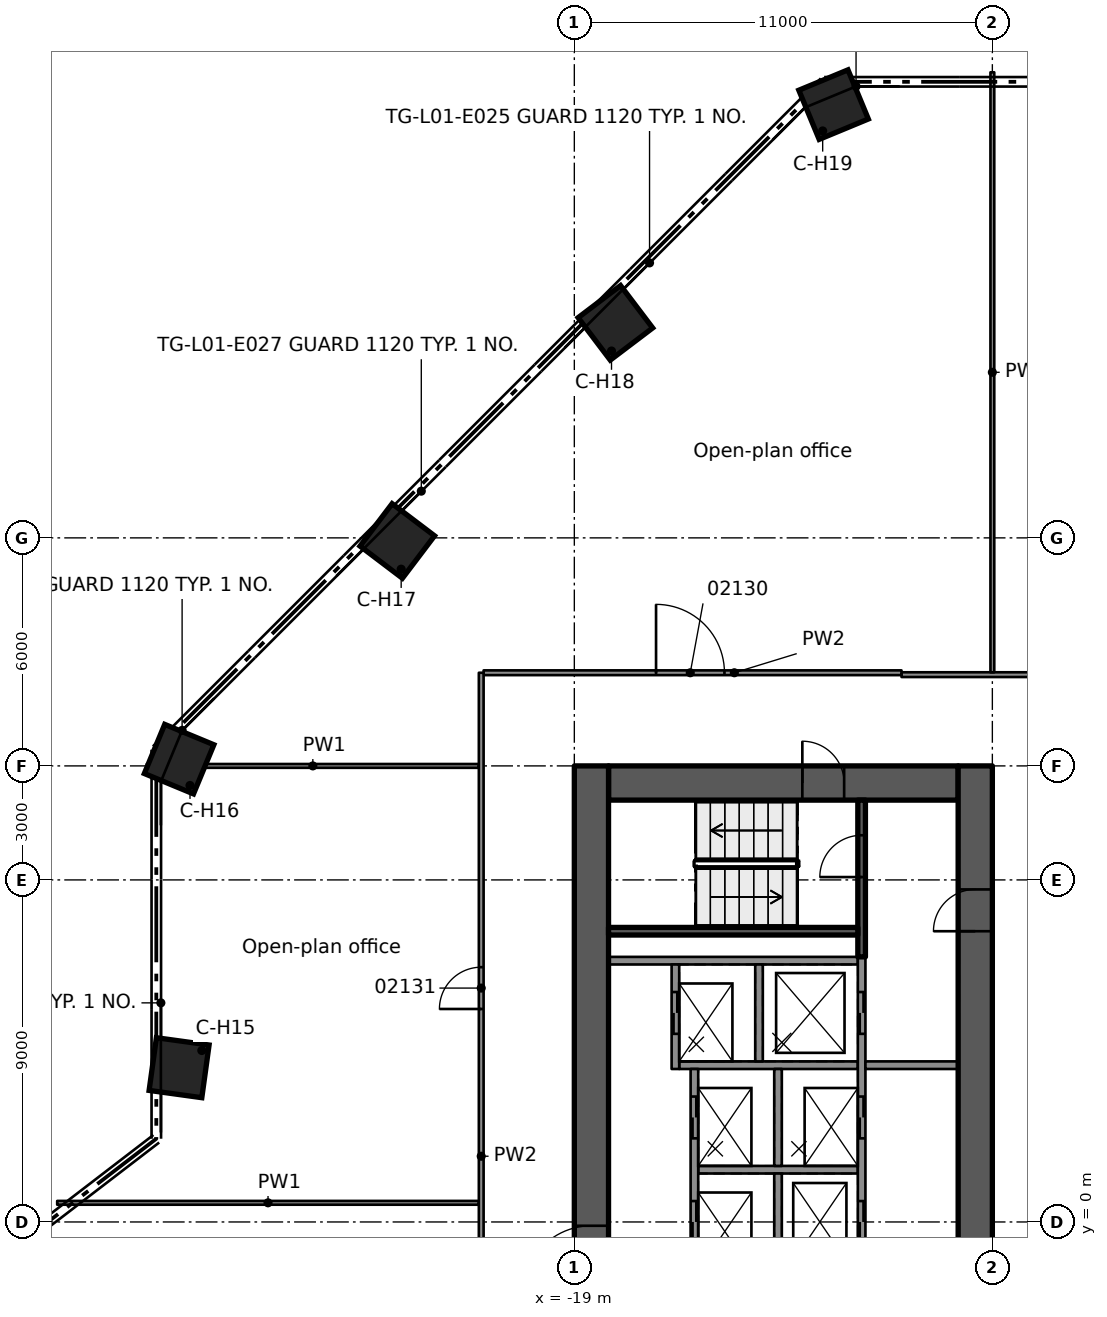
"""IFC4 building model, lengths in metres.
Left out: names, types, materials, properties, quantities, classifications, styles, units other than length and angle.
Written with IfcOpenShell. Run it as: python <this file> out.ifc"""

import sys

from ifc_helpers import new_model, si_unit, direction, frame, frame_2d, origin, origin_2d, place, context, subcontext, project, spatial, rectangle, extrude, element, fill, save


model = new_model("IFC4")
c1 = context("Model", 3, precision=1e-05, world=origin(), true_north=direction((0.0, 1.0)))
c2 = subcontext(c1, "Body", "Model", "MODEL_VIEW")
j1 = project(units=[si_unit("LENGTHUNIT", "METRE"), si_unit("PLANEANGLEUNIT", "RADIAN")], contexts=[c1])
p1 = place(None, origin())
s1 = spatial("IfcSite", under=j1, at=p1, CompositionType="ELEMENT")
p2 = place(p1, origin())
s2 = spatial("IfcBuilding", under=s1, at=p2, CompositionType="ELEMENT")
p3 = place(p2, frame((0.0, 0.0, 10.5)))
s3 = spatial("IfcBuildingStorey", under=s2, at=p3, CompositionType="ELEMENT", Elevation=10.5)
p4 = place(p3, frame((-18.1, 11.55, 0.0), z_axis=(0.0, 0.0, 1.0), x_axis=(1.0, 0.0, 0.0)))
e1 = element("IfcWall", 1, at=p4, inside=s3, PredefinedType="SHEAR", context=c2, shape_type="SweptSolid", body=[
    extrude(rectangle(XDim=9.2, YDim=0.9, at=frame_2d((4.6, 0.0))), origin(), (0.0, 0.0, 1.0), 5.0),
])
p5 = place(p4, frame((5.1, 0.0, 0.0)))
e2 = element("IfcOpeningElement", 2, at=p5, cuts=e1, PredefinedType="OPENING", context=c2, shape_type="SweptSolid", body=[
    extrude(rectangle(XDim=1.1, YDim=2.1, at=frame_2d((0.55, 1.05))), frame((0.0, 0.46, 0.0), z_axis=(0.0, -1.0, 0.0), x_axis=(1.0, 0.0, 0.0)), (0.0, 0.0, 1.0), 0.92),
])
p6 = place(p3, frame((-18.55, -12.0, 0.0), z_axis=(0.0, 0.0, 1.0), x_axis=(0.0, 1.0, 0.0)))
e3 = element("IfcWall", 3, at=p6, inside=s3, PredefinedType="SHEAR", context=c2, shape_type="SweptSolid", body=[
    extrude(rectangle(XDim=24.0, YDim=0.9, at=frame_2d((12.0, 0.0))), origin(), (0.0, 0.0, 1.0), 5.0),
])
p7 = place(p6, frame((10.1, 0.0, 0.0)))
e4 = element("IfcOpeningElement", 4, at=p7, cuts=e3, PredefinedType="OPENING", context=c2, shape_type="SweptSolid", body=[
    extrude(rectangle(XDim=1.8, YDim=2.1, at=frame_2d((0.9, 1.05))), frame((0.0, 0.46, 0.0), z_axis=(0.0, -1.0, 0.0), x_axis=(1.0, 0.0, 0.0)), (0.0, 0.0, 1.0), 0.92),
])
p8 = place(p3, frame((-8.45, -12.0, 0.0), z_axis=(0.0, 0.0, 1.0), x_axis=(0.0, 1.0, 0.0)))
e5 = element("IfcWall", 5, at=p8, inside=s3, PredefinedType="SHEAR", context=c2, shape_type="SweptSolid", body=[
    extrude(rectangle(XDim=24.0, YDim=0.9, at=frame_2d((12.0, 0.0))), origin(), (0.0, 0.0, 1.0), 5.0),
])
p9 = place(p8, frame((9.6, 0.0, 0.0)))
e6 = element("IfcOpeningElement", 6, at=p9, cuts=e5, PredefinedType="OPENING", context=c2, shape_type="SweptSolid", body=[
    extrude(rectangle(XDim=1.8, YDim=2.1, at=frame_2d((0.9, 1.05))), frame((0.0, 0.46, 0.0), z_axis=(0.0, -1.0, 0.0), x_axis=(1.0, 0.0, 0.0)), (0.0, 0.0, 1.0), 0.92),
])
p10 = place(p8, frame((19.65, 0.0, 0.0)))
e7 = element("IfcOpeningElement", 7, at=p10, cuts=e5, PredefinedType="OPENING", context=c2, shape_type="SweptSolid", body=[
    extrude(rectangle(XDim=1.1, YDim=2.1, at=frame_2d((0.55, 1.05))), frame((0.0, 0.46, 0.0), z_axis=(0.0, -1.0, 0.0), x_axis=(1.0, 0.0, 0.0)), (0.0, 0.0, 1.0), 0.92),
])
for number, where, z_axis, x_axis in (
    (8, (-29.4, 4.059, -1.0), (0.0, 0.0, 1.0), (0.707, 0.707, 0.0)),
    (9, (-29.4, 12.178, -1.0), (0.0, 0.0, 1.0), (0.707, 0.707, 0.0)),
    (10, (-23.659, 17.919, -1.0), (0.0, 0.0, 1.0), (0.707, 0.707, 0.0)),
    (11, (-17.919, 23.659, -1.0), (0.0, 0.0, 1.0), (0.707, 0.707, 0.0)),
    (12, (-12.178, 29.4, -1.0), (0.0, 0.0, 1.0), (0.707, 0.707, 0.0)),
):
    element("IfcColumn", number, at=place(p3, frame(where, z_axis=z_axis, x_axis=x_axis)), inside=s3, PredefinedType="COLUMN", context=c2, shape_type="SweptSolid", body=[
        extrude(rectangle(XDim=3.4, YDim=3.4, at=origin_2d()), origin(), (0.0, 0.0, 1.0), 1.0),
    ])
for number, where, z_axis, x_axis in (
    (13, (-29.4, 4.059, 0.0), (0.0, 0.0, 1.0), (-0.991, 0.137, 0.0)),
    (14, (-29.4, 12.178, 0.0), (0.0, 0.0, 1.0), (-0.924, 0.383, 0.0)),
    (15, (-23.659, 17.919, 0.0), (0.0, 0.0, 1.0), (-0.797, 0.604, 0.0)),
    (16, (-17.919, 23.659, 0.0), (0.0, 0.0, 1.0), (-0.604, 0.797, 0.0)),
    (17, (-12.178, 29.4, 0.0), (0.0, 0.0, 1.0), (-0.383, 0.924, 0.0)),
):
    element("IfcColumn", number, at=place(p3, frame(where, z_axis=z_axis, x_axis=x_axis)), inside=s3, PredefinedType="COLUMN", context=c2, shape_type="SweptSolid", body=[
        extrude(rectangle(XDim=1.4, YDim=1.4, at=origin_2d()), origin(), (0.0, 0.0, 1.0), 5.0),
    ])
p11 = place(p3, frame((-11.54, 6.875, 0.0), z_axis=(0.0, 0.0, 1.0), x_axis=(-1.0, 0.0, 0.0)))
e18 = element("IfcWall", 18, at=p11, inside=s3, PredefinedType="SOLIDWALL", context=c2, shape_type="SweptSolid", body=[
    extrude(rectangle(XDim=6.56, YDim=0.2, at=frame_2d((3.28, 0.0))), origin(), (0.0, 0.0, 1.0), 4.59),
])
p12 = place(p3, frame((-11.54, 1.375, 0.0), z_axis=(0.0, 0.0, 1.0), x_axis=(-1.0, 0.0, 0.0)))
e19 = element("IfcWall", 19, at=p12, inside=s3, PredefinedType="SOLIDWALL", context=c2, shape_type="SweptSolid", body=[
    extrude(rectangle(XDim=4.2, YDim=0.2, at=frame_2d((2.1, 0.0))), origin(), (0.0, 0.0, 1.0), 4.59),
])
p13 = place(p3, frame((-11.54, 4.125, 0.0), z_axis=(0.0, 0.0, 1.0), x_axis=(-1.0, 0.0, 0.0)))
e20 = element("IfcWall", 20, at=p13, inside=s3, PredefinedType="SOLIDWALL", context=c2, shape_type="SweptSolid", body=[
    extrude(rectangle(XDim=4.7, YDim=0.2, at=frame_2d((2.35, 0.0))), origin(), (0.0, 0.0, 1.0), 4.59),
])
p14 = place(p3, frame((-11.44, -6.975, 0.0), z_axis=(0.0, 0.0, 1.0), x_axis=(0.0, 1.0, 0.0)))
e21 = element("IfcWall", 21, at=p14, inside=s3, PredefinedType="SOLIDWALL", context=c2, shape_type="SweptSolid", body=[
    extrude(rectangle(XDim=13.95, YDim=0.2, at=frame_2d((6.975, 0.0))), origin(), (0.0, 0.0, 1.0), 4.59),
])
p15 = place(p14, frame((0.925, 0.0, 0.0)))
e22 = element("IfcOpeningElement", 22, at=p15, cuts=e21, PredefinedType="OPENING", context=c2, shape_type="SweptSolid", body=[
    extrude(rectangle(XDim=1.1, YDim=2.1, at=frame_2d((0.55, 1.05))), frame((0.0, 0.11, 0.0), z_axis=(0.0, -1.0, 0.0), x_axis=(1.0, 0.0, 0.0)), (0.0, 0.0, 1.0), 0.22),
])
p16 = place(p14, frame((6.425, 0.0, 0.0)))
e23 = element("IfcOpeningElement", 23, at=p16, cuts=e21, PredefinedType="OPENING", context=c2, shape_type="SweptSolid", body=[
    extrude(rectangle(XDim=1.1, YDim=2.1, at=frame_2d((0.55, 1.05))), frame((0.0, 0.11, 0.0), z_axis=(0.0, -1.0, 0.0), x_axis=(1.0, 0.0, 0.0)), (0.0, 0.0, 1.0), 0.22),
])
p17 = place(p14, frame((9.175, 0.0, 0.0)))
e24 = element("IfcOpeningElement", 24, at=p17, cuts=e21, PredefinedType="OPENING", context=c2, shape_type="SweptSolid", body=[
    extrude(rectangle(XDim=1.1, YDim=2.1, at=frame_2d((0.55, 1.05))), frame((0.0, 0.11, 0.0), z_axis=(0.0, -1.0, 0.0), x_axis=(1.0, 0.0, 0.0)), (0.0, 0.0, 1.0), 0.22),
])
p18 = place(p14, frame((11.925, 0.0, 0.0)))
e25 = element("IfcOpeningElement", 25, at=p18, cuts=e21, PredefinedType="OPENING", context=c2, shape_type="SweptSolid", body=[
    extrude(rectangle(XDim=1.1, YDim=2.1, at=frame_2d((0.55, 1.05))), frame((0.0, 0.11, 0.0), z_axis=(0.0, -1.0, 0.0), x_axis=(1.0, 0.0, 0.0)), (0.0, 0.0, 1.0), 0.22),
])
for number, where, z_axis, x_axis in (
    (26, (-13.64, -1.275, 0.0), (0.0, 0.0, 1.0), (0.0, 1.0, 0.0)),
    (27, (-13.64, 1.475, 0.0), (0.0, 0.0, 1.0), (0.0, 1.0, 0.0)),
    (28, (-14.14, 4.225, 0.0), (0.0, 0.0, 1.0), (0.0, 1.0, 0.0)),
):
    element("IfcWall", number, at=place(p3, frame(where, z_axis=z_axis, x_axis=x_axis)), inside=s3, PredefinedType="SOLIDWALL", context=c2, shape_type="SweptSolid", body=[
        extrude(rectangle(XDim=2.55, YDim=0.2, at=frame_2d((1.275, 0.0))), origin(), (0.0, 0.0, 1.0), 4.59),
    ])
p19 = place(p3, frame((-15.84, -4.025, 0.0), z_axis=(0.0, 0.0, 1.0), x_axis=(0.0, 1.0, 0.0)))
e29 = element("IfcWall", 29, at=p19, inside=s3, PredefinedType="SOLIDWALL", context=c2, shape_type="SweptSolid", body=[
    extrude(rectangle(XDim=8.05, YDim=0.2, at=frame_2d((4.025, 0.0))), origin(), (0.0, 0.0, 1.0), 4.59),
])
p20 = place(p19, frame((3.475, 0.0, 0.0)))
e30 = element("IfcOpeningElement", 30, at=p20, cuts=e29, PredefinedType="OPENING", context=c2, shape_type="SweptSolid", body=[
    extrude(rectangle(XDim=1.1, YDim=2.1, at=frame_2d((0.55, 1.05))), frame((0.0, 0.11, 0.0), z_axis=(0.0, -1.0, 0.0), x_axis=(1.0, 0.0, 0.0)), (0.0, 0.0, 1.0), 0.22),
])
p21 = place(p19, frame((6.225, 0.0, 0.0)))
e31 = element("IfcOpeningElement", 31, at=p21, cuts=e29, PredefinedType="OPENING", context=c2, shape_type="SweptSolid", body=[
    extrude(rectangle(XDim=1.1, YDim=2.1, at=frame_2d((0.55, 1.05))), frame((0.0, 0.11, 0.0), z_axis=(0.0, -1.0, 0.0), x_axis=(1.0, 0.0, 0.0)), (0.0, 0.0, 1.0), 0.22),
])
p22 = place(p3, frame((-16.34, 4.025, 0.0), z_axis=(0.0, 0.0, 1.0), x_axis=(0.0, 1.0, 0.0)))
e32 = element("IfcWall", 32, at=p22, inside=s3, PredefinedType="SOLIDWALL", context=c2, shape_type="SweptSolid", body=[
    extrude(rectangle(XDim=2.75, YDim=0.2, at=frame_2d((1.375, 0.0))), origin(), (0.0, 0.0, 1.0), 4.59),
])
p23 = place(p22, frame((0.925, 0.0, 0.0)))
e33 = element("IfcOpeningElement", 33, at=p23, cuts=e32, PredefinedType="OPENING", context=c2, shape_type="SweptSolid", body=[
    extrude(rectangle(XDim=1.1, YDim=2.1, at=frame_2d((0.55, 1.05))), frame((0.0, 0.11, 0.0), z_axis=(0.0, -1.0, 0.0), x_axis=(1.0, 0.0, 0.0)), (0.0, 0.0, 1.0), 0.22),
])
p24 = place(p3, frame((-11.44, 6.975, 0.0), z_axis=(0.0, 0.0, 1.0), x_axis=(0.0, 1.0, 0.0)))
e34 = element("IfcWall", 34, at=p24, inside=s3, PredefinedType="SOLIDWALL", context=c2, shape_type="SweptSolid", body=[
    extrude(rectangle(XDim=4.125, YDim=0.2, at=frame_2d((2.062, 0.0))), origin(), (0.0, 0.0, 1.0), 4.59),
])
p25 = place(p24, frame((2.1, 0.0, 0.0)))
e35 = element("IfcOpeningElement", 35, at=p25, cuts=e34, PredefinedType="OPENING", context=c2, shape_type="SweptSolid", body=[
    extrude(rectangle(XDim=1.1, YDim=2.1, at=frame_2d((0.55, 1.05))), frame((0.0, 0.11, 0.0), z_axis=(0.0, -1.0, 0.0), x_axis=(1.0, 0.0, 0.0)), (0.0, 0.0, 1.0), 0.22),
])
p26 = place(p3, frame((-11.54, 7.65, 0.0), z_axis=(0.0, 0.0, 1.0), x_axis=(-1.0, 0.0, 0.0)))
e36 = element("IfcWall", 36, at=p26, inside=s3, PredefinedType="SOLIDWALL", context=c2, shape_type="SweptSolid", body=[
    extrude(rectangle(XDim=6.56, YDim=0.2, at=frame_2d((3.28, 0.0))), origin(), (0.0, 0.0, 1.0), 4.59),
])
p27 = place(p3, frame((-8.9, 4.125, 0.0), z_axis=(0.0, 0.0, 1.0), x_axis=(-1.0, 0.0, 0.0)))
e37 = element("IfcWall", 37, at=p27, inside=s3, PredefinedType="PARTITIONING", context=c2, shape_type="SweptSolid", body=[
    extrude(rectangle(XDim=2.44, YDim=0.2, at=frame_2d((1.22, 0.0))), origin(), (0.0, 0.0, 1.0), 4.59),
])
p28 = place(p3, frame((-32.608, 0.504, 0.0), z_axis=(0.0, 0.0, 1.0), x_axis=(1.0, 0.0, 0.0)))
e38 = element("IfcWall", 38, at=p28, inside=s3, PredefinedType="PARTITIONING", context=c2, shape_type="SweptSolid", body=[
    extrude(rectangle(XDim=11.096, YDim=0.1, at=frame_2d((5.548, 0.0))), origin(), (0.0, 0.0, 1.0), 4.58),
])
p29 = place(p3, frame((-30.25, 12.0, 0.0), z_axis=(0.0, 0.0, 1.0), x_axis=(1.0, 0.0, 0.0)))
e39 = element("IfcWall", 39, at=p29, inside=s3, PredefinedType="PARTITIONING", context=c2, shape_type="SweptSolid", body=[
    extrude(rectangle(XDim=8.738, YDim=0.1, at=frame_2d((4.369, 0.0))), origin(), (0.0, 0.0, 1.0), 4.58),
])
p30 = place(p3, frame((-10.39, 14.401, 0.0), z_axis=(0.0, 0.0, 1.0), x_axis=(1.0, 0.0, 0.0)))
e40 = element("IfcWall", 40, at=p30, inside=s3, PredefinedType="PARTITIONING", context=c2, shape_type="SweptSolid", body=[
    extrude(rectangle(XDim=20.781, YDim=0.125, at=frame_2d((10.391, 0.0))), origin(), (0.0, 0.0, 1.0), 4.58),
])
p31 = place(p30, frame((13.49, 0.0, 0.0)))
e41 = element("IfcOpeningElement", 41, at=p31, cuts=e40, PredefinedType="OPENING", context=c2, shape_type="SweptSolid", body=[
    extrude(rectangle(XDim=1.8, YDim=2.1, at=frame_2d((0.9, 1.05))), frame((0.0, 0.073, 0.0), z_axis=(0.0, -1.0, 0.0), x_axis=(1.0, 0.0, 0.0)), (0.0, 0.0, 1.0), 0.145),
])
p32 = place(p30, frame((5.49, 0.0, 0.0)))
e42 = element("IfcOpeningElement", 42, at=p32, cuts=e40, PredefinedType="OPENING", context=c2, shape_type="SweptSolid", body=[
    extrude(rectangle(XDim=1.8, YDim=2.1, at=frame_2d((0.9, 1.05))), frame((0.0, 0.073, 0.0), z_axis=(0.0, -1.0, 0.0), x_axis=(1.0, 0.0, 0.0)), (0.0, 0.0, 1.0), 0.145),
])
p33 = place(p3, frame((-21.387, 14.451, 0.0), z_axis=(0.0, 0.0, 1.0), x_axis=(1.0, 0.0, 0.0)))
e43 = element("IfcWall", 43, at=p33, inside=s3, PredefinedType="PARTITIONING", context=c2, shape_type="SweptSolid", body=[
    extrude(rectangle(XDim=10.996, YDim=0.125, at=frame_2d((5.498, 0.0))), origin(), (0.0, 0.0, 1.0), 4.58),
])
p34 = place(p33, frame((4.538, 0.0, 0.0)))
e44 = element("IfcOpeningElement", 44, at=p34, cuts=e43, PredefinedType="OPENING", context=c2, shape_type="SweptSolid", body=[
    extrude(rectangle(XDim=1.8, YDim=2.1, at=frame_2d((0.9, 1.05))), frame((0.0, 0.073, 0.0), z_axis=(0.0, -1.0, 0.0), x_axis=(1.0, 0.0, 0.0)), (0.0, 0.0, 1.0), 0.145),
])
p35 = place(p3, frame((-8.0, 14.463, 0.0), z_axis=(0.0, 0.0, 1.0), x_axis=(0.0, 1.0, 0.0)))
e45 = element("IfcWall", 45, at=p35, inside=s3, PredefinedType="PARTITIONING", context=c2, shape_type="SweptSolid", body=[
    extrude(rectangle(XDim=15.787, YDim=0.1, at=frame_2d((7.894, 0.0))), origin(), (0.0, 0.0, 1.0), 4.58),
])
p36 = place(p3, frame((-21.45, -10.992, 0.0), z_axis=(0.0, 0.0, 1.0), x_axis=(0.0, 1.0, 0.0)))
e46 = element("IfcWall", 46, at=p36, inside=s3, PredefinedType="PARTITIONING", context=c2, shape_type="SweptSolid", body=[
    extrude(rectangle(XDim=25.443, YDim=0.125, at=frame_2d((12.721, 0.0))), origin(), (0.0, 0.0, 1.0), 4.58),
])
p37 = place(p36, frame((4.85, 0.0, 0.0)))
e47 = element("IfcOpeningElement", 47, at=p37, cuts=e46, PredefinedType="OPENING", context=c2, shape_type="SweptSolid", body=[
    extrude(rectangle(XDim=1.8, YDim=2.1, at=frame_2d((0.9, 1.05))), frame((0.0, 0.073, 0.0), z_axis=(0.0, -1.0, 0.0), x_axis=(1.0, 0.0, 0.0)), (0.0, 0.0, 1.0), 0.145),
])
p38 = place(p36, frame((16.596, 0.0, 0.0)))
e48 = element("IfcOpeningElement", 48, at=p38, cuts=e46, PredefinedType="OPENING", context=c2, shape_type="SweptSolid", body=[
    extrude(rectangle(XDim=1.1, YDim=2.1, at=frame_2d((0.55, 1.05))), frame((0.0, 0.073, 0.0), z_axis=(0.0, -1.0, 0.0), x_axis=(1.0, 0.0, 0.0)), (0.0, 0.0, 1.0), 0.145),
])
p39 = place(p16, origin())
e49 = element("IfcDoor", 49, at=p39, inside=s3, OperationType="DOUBLE_DOOR_SLIDING", PredefinedType="DOOR", context=c2, shape_type="SweptSolid", body=[
    extrude(rectangle(XDim=1.1, YDim=2.1, at=frame_2d((0.55, 1.05))), frame((0.0, 0.025, 0.0), z_axis=(0.0, -1.0, 0.0), x_axis=(1.0, 0.0, 0.0)), (0.0, 0.0, 1.0), 0.05),
])
fill(e23, e49)
p40 = place(p20, origin())
e50 = element("IfcDoor", 50, at=p40, inside=s3, OperationType="DOUBLE_DOOR_SLIDING", PredefinedType="DOOR", context=c2, shape_type="SweptSolid", body=[
    extrude(rectangle(XDim=1.1, YDim=2.1, at=frame_2d((0.55, 1.05))), frame((0.0, 0.025, 0.0), z_axis=(0.0, -1.0, 0.0), x_axis=(1.0, 0.0, 0.0)), (0.0, 0.0, 1.0), 0.05),
])
fill(e30, e50)
p41 = place(p17, origin())
e51 = element("IfcDoor", 51, at=p41, inside=s3, OperationType="DOUBLE_DOOR_SLIDING", PredefinedType="DOOR", context=c2, shape_type="SweptSolid", body=[
    extrude(rectangle(XDim=1.1, YDim=2.1, at=frame_2d((0.55, 1.05))), frame((0.0, 0.025, 0.0), z_axis=(0.0, -1.0, 0.0), x_axis=(1.0, 0.0, 0.0)), (0.0, 0.0, 1.0), 0.05),
])
fill(e24, e51)
p42 = place(p21, origin())
e52 = element("IfcDoor", 52, at=p42, inside=s3, OperationType="DOUBLE_DOOR_SLIDING", PredefinedType="DOOR", context=c2, shape_type="SweptSolid", body=[
    extrude(rectangle(XDim=1.1, YDim=2.1, at=frame_2d((0.55, 1.05))), frame((0.0, 0.025, 0.0), z_axis=(0.0, -1.0, 0.0), x_axis=(1.0, 0.0, 0.0)), (0.0, 0.0, 1.0), 0.05),
])
fill(e31, e52)
p43 = place(p18, origin())
e53 = element("IfcDoor", 53, at=p43, inside=s3, OperationType="DOUBLE_DOOR_SLIDING", PredefinedType="DOOR", context=c2, shape_type="SweptSolid", body=[
    extrude(rectangle(XDim=1.1, YDim=2.1, at=frame_2d((0.55, 1.05))), frame((0.0, 0.025, 0.0), z_axis=(0.0, -1.0, 0.0), x_axis=(1.0, 0.0, 0.0)), (0.0, 0.0, 1.0), 0.05),
])
fill(e25, e53)
p44 = place(p23, origin())
e54 = element("IfcDoor", 54, at=p44, inside=s3, OperationType="DOUBLE_DOOR_SLIDING", PredefinedType="DOOR", context=c2, shape_type="SweptSolid", body=[
    extrude(rectangle(XDim=1.1, YDim=2.1, at=frame_2d((0.55, 1.05))), frame((0.0, 0.025, 0.0), z_axis=(0.0, -1.0, 0.0), x_axis=(1.0, 0.0, 0.0)), (0.0, 0.0, 1.0), 0.05),
])
fill(e33, e54)
p45 = place(p7, origin())
e55 = element("IfcDoor", 55, at=p45, inside=s3, OperationType="SINGLE_SWING_LEFT", PredefinedType="DOOR", context=c2, shape_type="SweptSolid", body=[
    extrude(rectangle(XDim=1.8, YDim=2.1, at=frame_2d((0.9, 1.05))), frame((0.0, 0.025, 0.0), z_axis=(0.0, -1.0, 0.0), x_axis=(1.0, 0.0, 0.0)), (0.0, 0.0, 1.0), 0.05),
])
fill(e4, e55)
p46 = place(p10, origin())
e56 = element("IfcDoor", 56, at=p46, inside=s3, OperationType="SINGLE_SWING_RIGHT", PredefinedType="DOOR", context=c2, shape_type="SweptSolid", body=[
    extrude(rectangle(XDim=1.1, YDim=2.1, at=frame_2d((0.55, 1.05))), frame((0.0, 0.025, 0.0), z_axis=(0.0, -1.0, 0.0), x_axis=(1.0, 0.0, 0.0)), (0.0, 0.0, 1.0), 0.05),
])
fill(e7, e56)
p47 = place(p5, origin())
e57 = element("IfcDoor", 57, at=p47, inside=s3, OperationType="SINGLE_SWING_RIGHT", PredefinedType="DOOR", context=c2, shape_type="SweptSolid", body=[
    extrude(rectangle(XDim=1.1, YDim=2.1, at=frame_2d((0.55, 1.05))), frame((0.0, 0.025, 0.0), z_axis=(0.0, -1.0, 0.0), x_axis=(1.0, 0.0, 0.0)), (0.0, 0.0, 1.0), 0.05),
])
fill(e2, e57)
p48 = place(p25, origin())
e58 = element("IfcDoor", 58, at=p48, inside=s3, OperationType="SINGLE_SWING_RIGHT", PredefinedType="DOOR", context=c2, shape_type="SweptSolid", body=[
    extrude(rectangle(XDim=1.1, YDim=2.1, at=frame_2d((0.55, 1.05))), frame((0.0, 0.025, 0.0), z_axis=(0.0, -1.0, 0.0), x_axis=(1.0, 0.0, 0.0)), (0.0, 0.0, 1.0), 0.05),
])
fill(e35, e58)
p49 = place(p34, origin())
e59 = element("IfcDoor", 59, at=p49, inside=s3, OperationType="DOUBLE_DOOR_SINGLE_SWING", PredefinedType="DOOR", context=c2, shape_type="SweptSolid", body=[
    extrude(rectangle(XDim=1.8, YDim=2.1, at=frame_2d((0.9, 1.05))), frame((0.0, 0.025, 0.0), z_axis=(0.0, -1.0, 0.0), x_axis=(1.0, 0.0, 0.0)), (0.0, 0.0, 1.0), 0.05),
])
fill(e44, e59)
p50 = place(p38, origin())
e60 = element("IfcDoor", 60, at=p50, inside=s3, OperationType="SINGLE_SWING_RIGHT", PredefinedType="DOOR", context=c2, shape_type="SweptSolid", body=[
    extrude(rectangle(XDim=1.1, YDim=2.1, at=frame_2d((0.55, 1.05))), frame((0.0, 0.025, 0.0), z_axis=(0.0, -1.0, 0.0), x_axis=(1.0, 0.0, 0.0)), (0.0, 0.0, 1.0), 0.05),
])
fill(e48, e60)
save(model, sys.argv[1])
